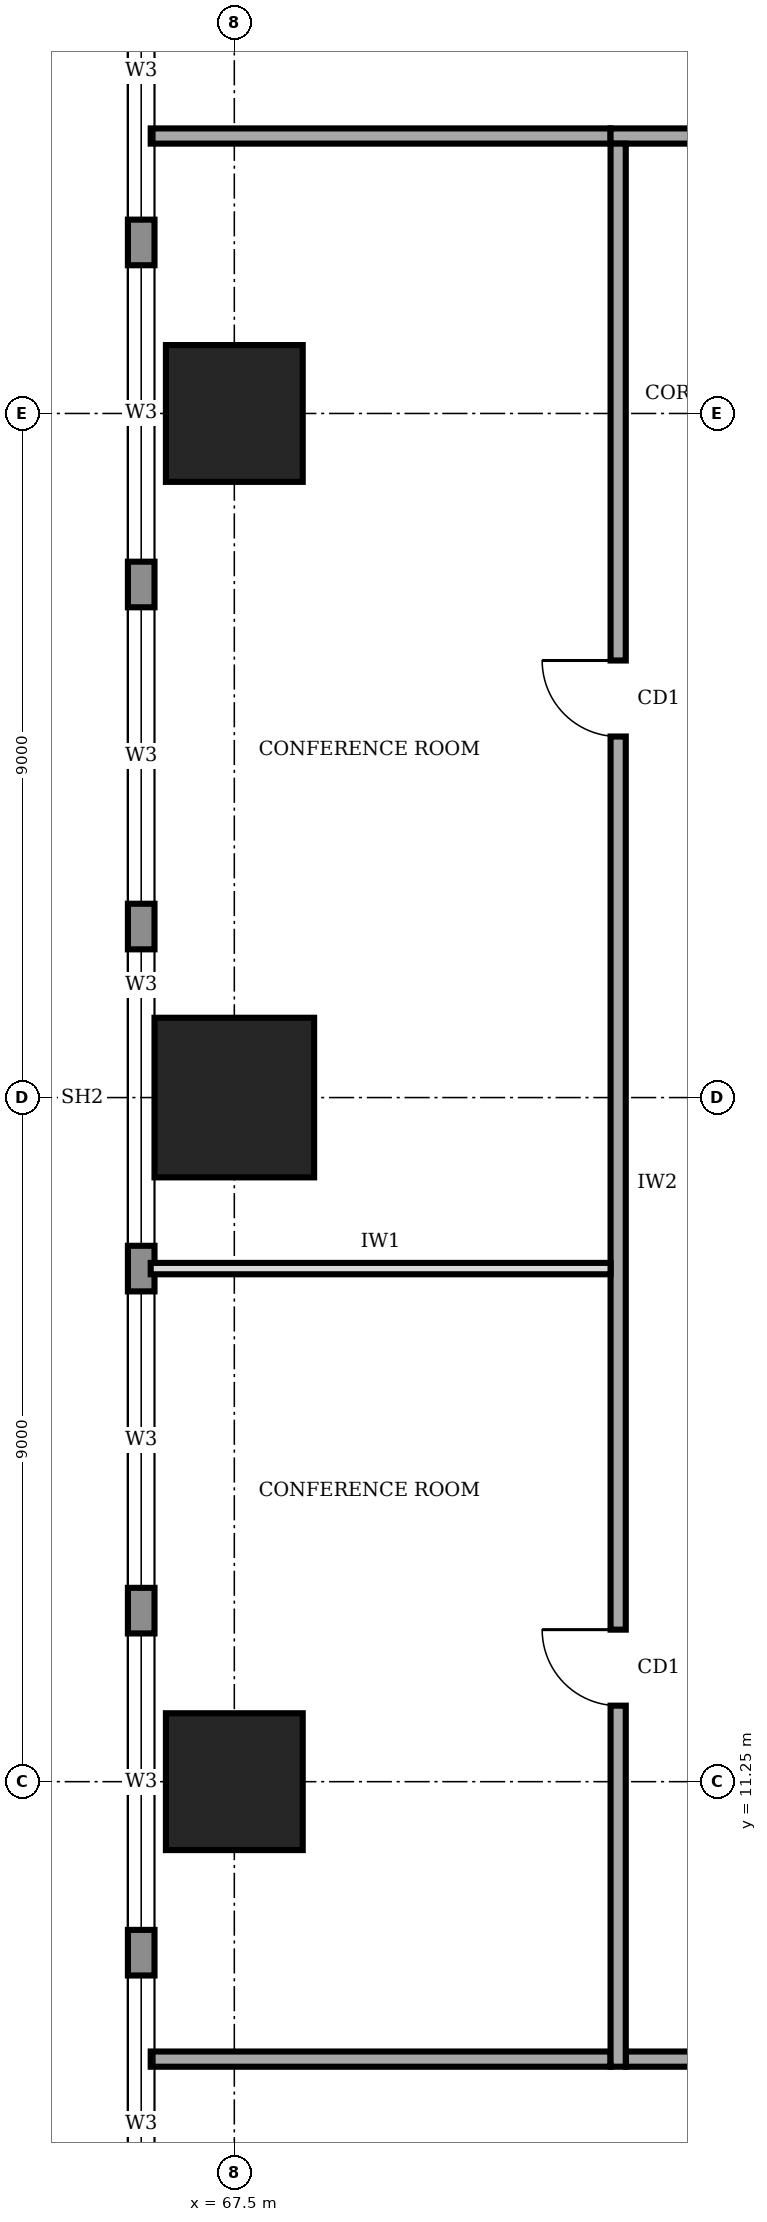
"""IFC4 building model, lengths in metres.
Left out: names, types, materials, properties, quantities, classifications, styles, units other than length and angle.
Written with IfcOpenShell. Run it as: python <this file> out.ifc"""

import sys

from ifc_helpers import new_model, si_unit, direction, frame, frame_2d, origin, origin_2d, place, context, subcontext, project, spatial, rectangle, extrude, element, fill, save


model = new_model("IFC4")
c1 = context("Model", 3, precision=1e-05, world=origin(), true_north=direction((0.0, 1.0)))
c2 = subcontext(c1, "Body", "Model", "MODEL_VIEW")
j1 = project(units=[si_unit("LENGTHUNIT", "METRE"), si_unit("PLANEANGLEUNIT", "RADIAN")], contexts=[c1])
p1 = place(None, origin())
s1 = spatial("IfcSite", under=j1, at=p1, CompositionType="ELEMENT")
p2 = place(p1, origin())
s2 = spatial("IfcBuilding", under=s1, at=p2, CompositionType="ELEMENT")
p3 = place(p2, frame((0.0, 0.0, 193.0)))
s3 = spatial("IfcBuildingStorey", under=s2, at=p3, CompositionType="ELEMENT", Elevation=193.0)
p4 = place(p3, frame((67.5, 11.25, 0.0), z_axis=(0.0, 0.0, 1.0), x_axis=(1.0, 0.0, 0.0)))
e1 = element("IfcColumn", 1, at=p4, inside=s3, PredefinedType="COLUMN", context=c2, shape_type="SweptSolid", body=[
    extrude(rectangle(XDim=1.8, YDim=1.8, at=origin_2d()), origin(), (0.0, 0.0, 1.0), 4.0),
])
p5 = place(p3, frame((67.5, 20.25, 0.0), z_axis=(0.0, 0.0, 1.0), x_axis=(1.0, 0.0, 0.0)))
e2 = element("IfcColumn", 2, at=p5, inside=s3, PredefinedType="COLUMN", context=c2, shape_type="SweptSolid", body=[
    extrude(rectangle(XDim=2.1, YDim=2.1, at=origin_2d()), origin(), (0.0, 0.0, 1.0), 4.0),
])
p6 = place(p3, frame((67.5, 29.25, 0.0), z_axis=(0.0, 0.0, 1.0), x_axis=(1.0, 0.0, 0.0)))
e3 = element("IfcColumn", 3, at=p6, inside=s3, PredefinedType="COLUMN", context=c2, shape_type="SweptSolid", body=[
    extrude(rectangle(XDim=1.8, YDim=1.8, at=origin_2d()), origin(), (0.0, 0.0, 1.0), 4.0),
])
p7 = place(p3, frame((66.275, 37.18, 0.0), z_axis=(0.0, 0.0, 1.0), x_axis=(0.0, -1.0, 0.0)))
e4 = element("IfcWall", 4, at=p7, inside=s3, PredefinedType="STANDARD", context=c2, shape_type="SweptSolid", body=[
    extrude(rectangle(XDim=33.86, YDim=0.35, at=frame_2d((16.93, 0.0))), origin(), (0.0, 0.0, 1.0), 3.75),
])
p8 = place(p7, frame((28.48, 0.0, 0.95)))
e5 = element("IfcOpeningElement", 5, at=p8, cuts=e4, PredefinedType="OPENING", context=c2, shape_type="SweptSolid", body=[
    extrude(rectangle(XDim=3.9, YDim=1.8, at=frame_2d((1.95, 0.9))), frame((0.0, 0.185, 0.0), z_axis=(0.0, -1.0, 0.0), x_axis=(1.0, 0.0, 0.0)), (0.0, 0.0, 1.0), 0.37),
])
p9 = place(p7, frame((23.98, 0.0, 0.95)))
e6 = element("IfcOpeningElement", 6, at=p9, cuts=e4, PredefinedType="OPENING", context=c2, shape_type="SweptSolid", body=[
    extrude(rectangle(XDim=3.9, YDim=1.8, at=frame_2d((1.95, 0.9))), frame((0.0, 0.185, 0.0), z_axis=(0.0, -1.0, 0.0), x_axis=(1.0, 0.0, 0.0)), (0.0, 0.0, 1.0), 0.37),
])
p10 = place(p7, frame((19.48, 0.0, 0.95)))
e7 = element("IfcOpeningElement", 7, at=p10, cuts=e4, PredefinedType="OPENING", context=c2, shape_type="SweptSolid", body=[
    extrude(rectangle(XDim=3.9, YDim=1.8, at=frame_2d((1.95, 0.9))), frame((0.0, 0.185, 0.0), z_axis=(0.0, -1.0, 0.0), x_axis=(1.0, 0.0, 0.0)), (0.0, 0.0, 1.0), 0.37),
])
p11 = place(p7, frame((14.98, 0.0, 0.95)))
e8 = element("IfcOpeningElement", 8, at=p11, cuts=e4, PredefinedType="OPENING", context=c2, shape_type="SweptSolid", body=[
    extrude(rectangle(XDim=3.9, YDim=1.8, at=frame_2d((1.95, 0.9))), frame((0.0, 0.185, 0.0), z_axis=(0.0, -1.0, 0.0), x_axis=(1.0, 0.0, 0.0)), (0.0, 0.0, 1.0), 0.37),
])
p12 = place(p7, frame((10.48, 0.0, 0.95)))
e9 = element("IfcOpeningElement", 9, at=p12, cuts=e4, PredefinedType="OPENING", context=c2, shape_type="SweptSolid", body=[
    extrude(rectangle(XDim=3.9, YDim=1.8, at=frame_2d((1.95, 0.9))), frame((0.0, 0.185, 0.0), z_axis=(0.0, -1.0, 0.0), x_axis=(1.0, 0.0, 0.0)), (0.0, 0.0, 1.0), 0.37),
])
p13 = place(p7, frame((5.98, 0.0, 0.95)))
e10 = element("IfcOpeningElement", 10, at=p13, cuts=e4, PredefinedType="OPENING", context=c2, shape_type="SweptSolid", body=[
    extrude(rectangle(XDim=3.9, YDim=1.8, at=frame_2d((1.95, 0.9))), frame((0.0, 0.185, 0.0), z_axis=(0.0, -1.0, 0.0), x_axis=(1.0, 0.0, 0.0)), (0.0, 0.0, 1.0), 0.37),
])
p14 = place(p7, frame((1.48, 0.0, 0.95)))
e11 = element("IfcOpeningElement", 11, at=p14, cuts=e4, PredefinedType="OPENING", context=c2, shape_type="SweptSolid", body=[
    extrude(rectangle(XDim=3.9, YDim=1.8, at=frame_2d((1.95, 0.9))), frame((0.0, 0.185, 0.0), z_axis=(0.0, -1.0, 0.0), x_axis=(1.0, 0.0, 0.0)), (0.0, 0.0, 1.0), 0.37),
])
p15 = place(p3, frame((72.65, 7.6, 0.0), z_axis=(0.0, 0.0, 1.0), x_axis=(1.0, 0.0, 0.0)))
e12 = element("IfcWall", 12, at=p15, inside=s3, PredefinedType="SOLIDWALL", context=c2, shape_type="SweptSolid", body=[
    extrude(rectangle(XDim=16.9, YDim=0.2, at=frame_2d((8.45, 0.0))), origin(), (0.0, 0.0, 1.0), 3.75),
])
p16 = place(p15, frame((3.575, 0.0, 0.0)))
e13 = element("IfcOpeningElement", 13, at=p16, cuts=e12, PredefinedType="OPENING", context=c2, shape_type="SweptSolid", body=[
    extrude(rectangle(XDim=1.0, YDim=2.1, at=frame_2d((0.5, 1.05))), frame((0.0, 0.11, 0.0), z_axis=(0.0, -1.0, 0.0), x_axis=(1.0, 0.0, 0.0)), (0.0, 0.0, 1.0), 0.22),
])
p17 = place(p3, frame((89.35, 32.9, 0.0), z_axis=(0.0, 0.0, 1.0), x_axis=(-1.0, 0.0, 0.0)))
e14 = element("IfcWall", 14, at=p17, inside=s3, PredefinedType="SOLIDWALL", context=c2, shape_type="SweptSolid", body=[
    extrude(rectangle(XDim=16.9, YDim=0.2, at=frame_2d((8.45, 0.0))), origin(), (0.0, 0.0, 1.0), 3.75),
])
p18 = place(p17, frame((14.375, 0.0, 0.0)))
e15 = element("IfcOpeningElement", 15, at=p18, cuts=e14, PredefinedType="OPENING", context=c2, shape_type="SweptSolid", body=[
    extrude(rectangle(XDim=1.0, YDim=2.1, at=frame_2d((0.5, 1.05))), frame((0.0, 0.11, 0.0), z_axis=(0.0, -1.0, 0.0), x_axis=(1.0, 0.0, 0.0)), (0.0, 0.0, 1.0), 0.22),
])
p19 = place(p3, frame((72.55, 32.8, 0.0), z_axis=(0.0, 0.0, 1.0), x_axis=(0.0, -1.0, 0.0)))
e16 = element("IfcWall", 16, at=p19, inside=s3, PredefinedType="SOLIDWALL", context=c2, shape_type="SweptSolid", body=[
    extrude(rectangle(XDim=25.3, YDim=0.2, at=frame_2d((12.65, 0.0))), origin(), (0.0, 0.0, 1.0), 3.75),
])
p20 = place(p19, frame((19.55, 0.0, 0.0)))
e17 = element("IfcOpeningElement", 17, at=p20, cuts=e16, PredefinedType="OPENING", context=c2, shape_type="SweptSolid", body=[
    extrude(rectangle(XDim=1.0, YDim=2.1, at=frame_2d((0.5, 1.05))), frame((0.0, 0.11, 0.0), z_axis=(0.0, -1.0, 0.0), x_axis=(1.0, 0.0, 0.0)), (0.0, 0.0, 1.0), 0.22),
])
p21 = place(p19, frame((6.8, 0.0, 0.0)))
e18 = element("IfcOpeningElement", 18, at=p21, cuts=e16, PredefinedType="OPENING", context=c2, shape_type="SweptSolid", body=[
    extrude(rectangle(XDim=1.0, YDim=2.1, at=frame_2d((0.5, 1.05))), frame((0.0, 0.11, 0.0), z_axis=(0.0, -1.0, 0.0), x_axis=(1.0, 0.0, 0.0)), (0.0, 0.0, 1.0), 0.22),
])
for number, where, z_axis, x_axis in (
    (19, (66.4, 7.6, 0.0), (0.0, 0.0, 1.0), (1.0, 0.0, 0.0)),
    (20, (66.4, 32.9, 0.0), (0.0, 0.0, 1.0), (1.0, 0.0, 0.0)),
):
    element("IfcWall", number, at=place(p3, frame(where, z_axis=z_axis, x_axis=x_axis)), inside=s3, PredefinedType="SOLIDWALL", context=c2, shape_type="SweptSolid", body=[
        extrude(rectangle(XDim=6.05, YDim=0.2, at=frame_2d((3.025, 0.0))), origin(), (0.0, 0.0, 1.0), 3.75),
    ])
p22 = place(p3, frame((66.4, 18.0, 0.0), z_axis=(0.0, 0.0, 1.0), x_axis=(1.0, 0.0, 0.0)))
e21 = element("IfcWall", 21, at=p22, inside=s3, PredefinedType="PARTITIONING", context=c2, shape_type="SweptSolid", body=[
    extrude(rectangle(XDim=6.05, YDim=0.15, at=frame_2d((3.025, 0.0))), origin(), (0.0, 0.0, 1.0), 3.75),
])
p23 = place(p8, origin())
e22 = element("IfcWindow", 22, at=p23, inside=s3, PartitioningType="SINGLE_PANEL", PredefinedType="WINDOW", context=c2, shape_type="SweptSolid", body=[
    extrude(rectangle(XDim=3.9, YDim=1.8, at=frame_2d((1.95, 0.9))), frame((0.0, 0.03, 0.0), z_axis=(0.0, -1.0, 0.0), x_axis=(1.0, 0.0, 0.0)), (0.0, 0.0, 1.0), 0.06),
])
fill(e5, e22)
p24 = place(p9, origin())
e23 = element("IfcWindow", 23, at=p24, inside=s3, PartitioningType="SINGLE_PANEL", PredefinedType="WINDOW", context=c2, shape_type="SweptSolid", body=[
    extrude(rectangle(XDim=3.9, YDim=1.8, at=frame_2d((1.95, 0.9))), frame((0.0, 0.03, 0.0), z_axis=(0.0, -1.0, 0.0), x_axis=(1.0, 0.0, 0.0)), (0.0, 0.0, 1.0), 0.06),
])
fill(e6, e23)
p25 = place(p10, origin())
e24 = element("IfcWindow", 24, at=p25, inside=s3, PartitioningType="SINGLE_PANEL", PredefinedType="WINDOW", context=c2, shape_type="SweptSolid", body=[
    extrude(rectangle(XDim=3.9, YDim=1.8, at=frame_2d((1.95, 0.9))), frame((0.0, 0.03, 0.0), z_axis=(0.0, -1.0, 0.0), x_axis=(1.0, 0.0, 0.0)), (0.0, 0.0, 1.0), 0.06),
])
fill(e7, e24)
p26 = place(p11, origin())
e25 = element("IfcWindow", 25, at=p26, inside=s3, PartitioningType="SINGLE_PANEL", PredefinedType="WINDOW", context=c2, shape_type="SweptSolid", body=[
    extrude(rectangle(XDim=3.9, YDim=1.8, at=frame_2d((1.95, 0.9))), frame((0.0, 0.03, 0.0), z_axis=(0.0, -1.0, 0.0), x_axis=(1.0, 0.0, 0.0)), (0.0, 0.0, 1.0), 0.06),
])
fill(e8, e25)
p27 = place(p12, origin())
e26 = element("IfcWindow", 26, at=p27, inside=s3, PartitioningType="SINGLE_PANEL", PredefinedType="WINDOW", context=c2, shape_type="SweptSolid", body=[
    extrude(rectangle(XDim=3.9, YDim=1.8, at=frame_2d((1.95, 0.9))), frame((0.0, 0.03, 0.0), z_axis=(0.0, -1.0, 0.0), x_axis=(1.0, 0.0, 0.0)), (0.0, 0.0, 1.0), 0.06),
])
fill(e9, e26)
p28 = place(p13, origin())
e27 = element("IfcWindow", 27, at=p28, inside=s3, PartitioningType="SINGLE_PANEL", PredefinedType="WINDOW", context=c2, shape_type="SweptSolid", body=[
    extrude(rectangle(XDim=3.9, YDim=1.8, at=frame_2d((1.95, 0.9))), frame((0.0, 0.03, 0.0), z_axis=(0.0, -1.0, 0.0), x_axis=(1.0, 0.0, 0.0)), (0.0, 0.0, 1.0), 0.06),
])
fill(e10, e27)
p29 = place(p14, origin())
e28 = element("IfcWindow", 28, at=p29, inside=s3, PartitioningType="SINGLE_PANEL", PredefinedType="WINDOW", context=c2, shape_type="SweptSolid", body=[
    extrude(rectangle(XDim=3.9, YDim=1.8, at=frame_2d((1.95, 0.9))), frame((0.0, 0.03, 0.0), z_axis=(0.0, -1.0, 0.0), x_axis=(1.0, 0.0, 0.0)), (0.0, 0.0, 1.0), 0.06),
])
fill(e11, e28)
p30 = place(p20, frame((1.0, 0.0, 0.0), z_axis=(0.0, 0.0, 1.0), x_axis=(-1.0, 0.0, 0.0)))
e29 = element("IfcDoor", 29, at=p30, inside=s3, OperationType="SINGLE_SWING_RIGHT", PredefinedType="DOOR", context=c2, shape_type="SweptSolid", body=[
    extrude(rectangle(XDim=1.0, YDim=2.1, at=frame_2d((0.5, 1.05))), frame((0.0, 0.025, 0.0), z_axis=(0.0, -1.0, 0.0), x_axis=(1.0, 0.0, 0.0)), (0.0, 0.0, 1.0), 0.05),
])
fill(e17, e29)
p31 = place(p21, frame((1.0, 0.0, 0.0), z_axis=(0.0, 0.0, 1.0), x_axis=(-1.0, 0.0, 0.0)))
e30 = element("IfcDoor", 30, at=p31, inside=s3, OperationType="SINGLE_SWING_RIGHT", PredefinedType="DOOR", context=c2, shape_type="SweptSolid", body=[
    extrude(rectangle(XDim=1.0, YDim=2.1, at=frame_2d((0.5, 1.05))), frame((0.0, 0.025, 0.0), z_axis=(0.0, -1.0, 0.0), x_axis=(1.0, 0.0, 0.0)), (0.0, 0.0, 1.0), 0.05),
])
fill(e18, e30)
save(model, sys.argv[1])
